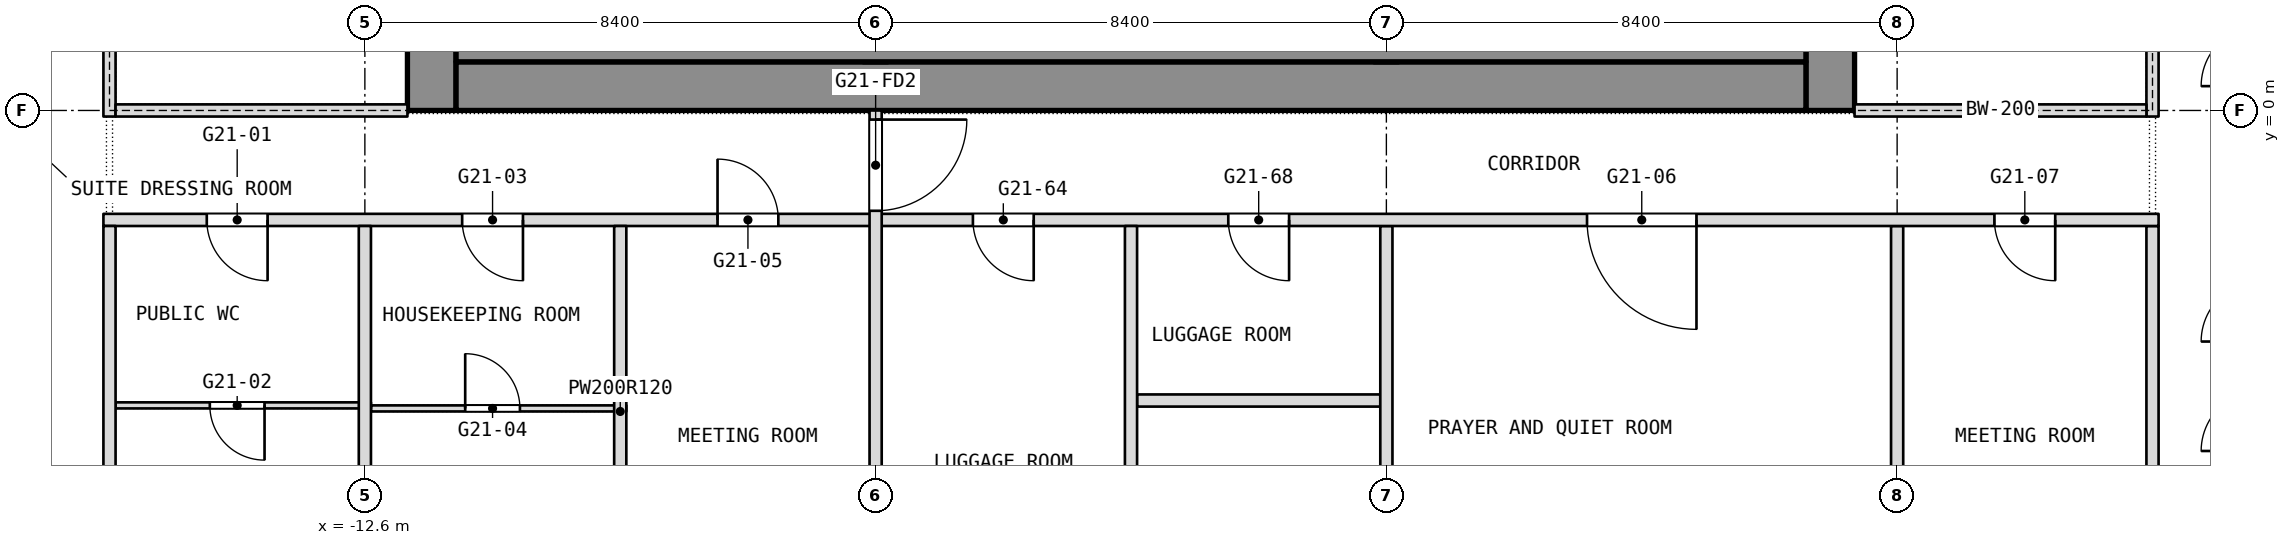
"""IFC4 building model, lengths in metres.
Left out: names, types, materials, properties, quantities, classifications, styles, units other than length and angle.
Written with IfcOpenShell. Run it as: python <this file> out.ifc"""

import sys

from ifc_helpers import new_model, si_unit, direction, frame, frame_2d, origin, place, context, subcontext, project, spatial, rectangle, extrude, element, fill, save


model = new_model("IFC4")
c1 = context("Model", 3, precision=1e-05, world=origin(), true_north=direction((0.0, 1.0)))
c2 = subcontext(c1, "Body", "Model", "MODEL_VIEW")
j1 = project(units=[si_unit("LENGTHUNIT", "METRE"), si_unit("PLANEANGLEUNIT", "RADIAN")], contexts=[c1])
p1 = place(None, origin())
s1 = spatial("IfcSite", under=j1, at=p1, CompositionType="ELEMENT")
p2 = place(p1, origin())
s2 = spatial("IfcBuilding", under=s1, at=p2, CompositionType="ELEMENT")
p3 = place(p2, frame((0.0, 0.0, 245.3)))
s3 = spatial("IfcBuildingStorey", under=s2, at=p3, CompositionType="ELEMENT", Elevation=245.3)
p4 = place(p3, frame((11.5, 0.0, 0.0), z_axis=(0.0, 0.0, 1.0), x_axis=(0.0, 1.0, 0.0)))
e1 = element("IfcWall", 1, at=p4, inside=s3, PredefinedType="SHEAR", context=c2, shape_type="SweptSolid", body=[
    extrude(rectangle(XDim=16.8, YDim=0.8, at=frame_2d((8.4, 0.0))), origin(), (0.0, 0.0, 1.0), 3.6),
])
p5 = place(p4, frame((2.3, 0.0, 0.0)))
e2 = element("IfcOpeningElement", 2, at=p5, cuts=e1, PredefinedType="OPENING", context=c2, shape_type="SweptSolid", body=[
    extrude(rectangle(XDim=1.1, YDim=2.1, at=frame_2d((0.55, 1.05))), frame((0.0, 0.4, 0.0), z_axis=(0.0, -1.0, 0.0), x_axis=(1.0, 0.0, 0.0)), (0.0, 0.0, 1.0), 0.8),
])
p6 = place(p4, frame((4.85, 0.0, 0.0)))
e3 = element("IfcOpeningElement", 3, at=p6, cuts=e1, PredefinedType="OPENING", context=c2, shape_type="SweptSolid", body=[
    extrude(rectangle(XDim=1.1, YDim=2.1, at=frame_2d((0.55, 1.05))), frame((0.0, 0.4, 0.0), z_axis=(0.0, -1.0, 0.0), x_axis=(1.0, 0.0, 0.0)), (0.0, 0.0, 1.0), 0.8),
])
p7 = place(p4, frame((6.825, 0.0, 0.0)))
e4 = element("IfcOpeningElement", 4, at=p7, cuts=e1, PredefinedType="OPENING", context=c2, shape_type="SweptSolid", body=[
    extrude(rectangle(XDim=1.2, YDim=2.1, at=frame_2d((0.6, 1.05))), frame((0.0, 0.4, 0.0), z_axis=(0.0, -1.0, 0.0), x_axis=(1.0, 0.0, 0.0)), (0.0, 0.0, 1.0), 0.8),
])
p8 = place(p4, frame((13.4, 0.0, 0.0)))
e5 = element("IfcOpeningElement", 5, at=p8, cuts=e1, PredefinedType="OPENING", context=c2, shape_type="SweptSolid", body=[
    extrude(rectangle(XDim=1.1, YDim=2.1, at=frame_2d((0.55, 1.05))), frame((0.0, 0.4, 0.0), z_axis=(0.0, -1.0, 0.0), x_axis=(1.0, 0.0, 0.0)), (0.0, 0.0, 1.0), 0.8),
])
p9 = place(p4, frame((10.85, 0.0, 0.0)))
e6 = element("IfcOpeningElement", 6, at=p9, cuts=e1, PredefinedType="OPENING", context=c2, shape_type="SweptSolid", body=[
    extrude(rectangle(XDim=1.1, YDim=2.1, at=frame_2d((0.55, 1.05))), frame((0.0, 0.4, 0.0), z_axis=(0.0, -1.0, 0.0), x_axis=(1.0, 0.0, 0.0)), (0.0, 0.0, 1.0), 0.8),
])
p10 = place(p4, frame((8.775, 0.0, 0.0)))
e7 = element("IfcOpeningElement", 7, at=p10, cuts=e1, PredefinedType="OPENING", context=c2, shape_type="SweptSolid", body=[
    extrude(rectangle(XDim=1.2, YDim=2.1, at=frame_2d((0.6, 1.05))), frame((0.0, 0.4, 0.0), z_axis=(0.0, -1.0, 0.0), x_axis=(1.0, 0.0, 0.0)), (0.0, 0.0, 1.0), 0.8),
])
p11 = place(p3, frame((-11.5, 0.0, 0.0), z_axis=(0.0, 0.0, 1.0), x_axis=(0.0, 1.0, 0.0)))
e8 = element("IfcWall", 8, at=p11, inside=s3, PredefinedType="SHEAR", context=c2, shape_type="SweptSolid", body=[
    extrude(rectangle(XDim=16.8, YDim=0.8, at=frame_2d((8.4, 0.0))), origin(), (0.0, 0.0, 1.0), 3.6),
])
p12 = place(p11, frame((3.6, 0.0, 0.0)))
e9 = element("IfcOpeningElement", 9, at=p12, cuts=e8, PredefinedType="OPENING", context=c2, shape_type="SweptSolid", body=[
    extrude(rectangle(XDim=0.9, YDim=2.1, at=frame_2d((0.45, 1.05))), frame((0.0, 0.4, 0.0), z_axis=(0.0, -1.0, 0.0), x_axis=(1.0, 0.0, 0.0)), (0.0, 0.0, 1.0), 0.8),
])
p13 = place(p11, frame((6.825, 0.0, 0.0)))
e10 = element("IfcOpeningElement", 10, at=p13, cuts=e8, PredefinedType="OPENING", context=c2, shape_type="SweptSolid", body=[
    extrude(rectangle(XDim=1.2, YDim=2.1, at=frame_2d((0.6, 1.05))), frame((0.0, 0.4, 0.0), z_axis=(0.0, -1.0, 0.0), x_axis=(1.0, 0.0, 0.0)), (0.0, 0.0, 1.0), 0.8),
])
p14 = place(p11, frame((14.062, 0.0, 0.0)))
e11 = element("IfcOpeningElement", 11, at=p14, cuts=e8, PredefinedType="OPENING", context=c2, shape_type="SweptSolid", body=[
    extrude(rectangle(XDim=0.9, YDim=2.1, at=frame_2d((0.45, 1.05))), frame((0.0, 0.4, 0.0), z_axis=(0.0, -1.0, 0.0), x_axis=(1.0, 0.0, 0.0)), (0.0, 0.0, 1.0), 0.8),
])
p15 = place(p11, frame((11.438, 0.0, 0.0)))
e12 = element("IfcOpeningElement", 12, at=p15, cuts=e8, PredefinedType="OPENING", context=c2, shape_type="SweptSolid", body=[
    extrude(rectangle(XDim=0.9, YDim=2.1, at=frame_2d((0.45, 1.05))), frame((0.0, 0.4, 0.0), z_axis=(0.0, -1.0, 0.0), x_axis=(1.0, 0.0, 0.0)), (0.0, 0.0, 1.0), 0.8),
])
p16 = place(p11, frame((8.775, 0.0, 0.0)))
e13 = element("IfcOpeningElement", 13, at=p16, cuts=e8, PredefinedType="OPENING", context=c2, shape_type="SweptSolid", body=[
    extrude(rectangle(XDim=1.2, YDim=2.1, at=frame_2d((0.6, 1.05))), frame((0.0, 0.4, 0.0), z_axis=(0.0, -1.0, 0.0), x_axis=(1.0, 0.0, 0.0)), (0.0, 0.0, 1.0), 0.8),
])
p17 = place(p3, frame((-11.1, 0.4, 0.0), z_axis=(0.0, 0.0, 1.0), x_axis=(1.0, 0.0, 0.0)))
e14 = element("IfcWall", 14, at=p17, inside=s3, PredefinedType="SHEAR", context=c2, shape_type="SweptSolid", body=[
    extrude(rectangle(XDim=22.2, YDim=0.8, at=frame_2d((11.1, 0.0))), origin(), (0.0, 0.0, 1.0), 3.6),
])
p18 = place(p3, frame((-4.2, 0.8, 0.0), z_axis=(0.0, 0.0, 1.0), x_axis=(0.0, 1.0, 0.0)))
e15 = element("IfcWall", 15, at=p18, inside=s3, PredefinedType="SHEAR", context=c2, shape_type="SweptSolid", body=[
    extrude(rectangle(XDim=15.2, YDim=0.4, at=frame_2d((7.6, 0.0))), origin(), (0.0, 0.0, 1.0), 3.6),
])
p19 = place(p18, frame((8.5, 0.0, 0.0)))
e16 = element("IfcOpeningElement", 16, at=p19, cuts=e15, PredefinedType="OPENING", context=c2, shape_type="SweptSolid", body=[
    extrude(rectangle(XDim=1.2, YDim=2.1, at=frame_2d((0.6, 1.05))), frame((0.0, 0.2, 0.0), z_axis=(0.0, -1.0, 0.0), x_axis=(1.0, 0.0, 0.0)), (0.0, 0.0, 1.0), 0.4),
])
p20 = place(p3, frame((4.2, 0.8, 0.0), z_axis=(0.0, 0.0, 1.0), x_axis=(0.0, 1.0, 0.0)))
e17 = element("IfcWall", 17, at=p20, inside=s3, PredefinedType="SHEAR", context=c2, shape_type="SweptSolid", body=[
    extrude(rectangle(XDim=15.2, YDim=0.4, at=frame_2d((7.6, 0.0))), origin(), (0.0, 0.0, 1.0), 3.6),
])
p21 = place(p20, frame((5.95, 0.0, 0.0)))
e18 = element("IfcOpeningElement", 18, at=p21, cuts=e17, PredefinedType="OPENING", context=c2, shape_type="SweptSolid", body=[
    extrude(rectangle(XDim=1.2, YDim=2.1, at=frame_2d((0.6, 1.05))), frame((0.0, 0.2, 0.0), z_axis=(0.0, -1.0, 0.0), x_axis=(1.0, 0.0, 0.0)), (0.0, 0.0, 1.0), 0.4),
])
for number, where, z_axis, x_axis in (
    (19, (16.8, -7.8, 0.0), (0.0, 0.0, 1.0), (0.0, 1.0, 0.0)),
    (20, (12.6, -7.8, 0.0), (0.0, 0.0, 1.0), (0.0, 1.0, 0.0)),
):
    element("IfcWall", number, at=place(p3, frame(where, z_axis=z_axis, x_axis=x_axis)), inside=s3, PredefinedType="PARTITIONING", context=c2, shape_type="SweptSolid", body=[
        extrude(rectangle(XDim=5.9, YDim=0.2, at=frame_2d((2.95, 0.0))), origin(), (0.0, 0.0, 1.0), 3.34),
    ])
p22 = place(p3, frame((-12.5, -4.9, 0.0), z_axis=(0.0, 0.0, 1.0), x_axis=(1.0, 0.0, 0.0)))
e21 = element("IfcWall", 21, at=p22, inside=s3, PredefinedType="PARTITIONING", context=c2, shape_type="SweptSolid", body=[
    extrude(rectangle(XDim=4.2, YDim=0.1, at=frame_2d((2.1, 0.0))), origin(), (0.0, 0.0, 1.0), 3.34),
])
p23 = place(p22, frame((1.55, 0.0, 0.0)))
e22 = element("IfcOpeningElement", 22, at=p23, cuts=e21, PredefinedType="OPENING", context=c2, shape_type="SweptSolid", body=[
    extrude(rectangle(XDim=0.9, YDim=2.1, at=frame_2d((0.45, 1.05))), frame((0.0, 0.05, 0.0), z_axis=(0.0, -1.0, 0.0), x_axis=(1.0, 0.0, 0.0)), (0.0, 0.0, 1.0), 0.1),
])
p24 = place(p3, frame((-16.7, -4.85, 0.0), z_axis=(0.0, 0.0, 1.0), x_axis=(1.0, 0.0, 0.0)))
e23 = element("IfcWall", 23, at=p24, inside=s3, PredefinedType="PARTITIONING", context=c2, shape_type="SweptSolid", body=[
    extrude(rectangle(XDim=4.2, YDim=0.1, at=frame_2d((2.1, 0.0))), origin(), (0.0, 0.0, 1.0), 3.34),
])
p25 = place(p24, frame((1.55, 0.0, 0.0)))
e24 = element("IfcOpeningElement", 24, at=p25, cuts=e23, PredefinedType="OPENING", context=c2, shape_type="SweptSolid", body=[
    extrude(rectangle(XDim=0.9, YDim=2.1, at=frame_2d((0.45, 1.05))), frame((0.0, 0.05, 0.0), z_axis=(0.0, -1.0, 0.0), x_axis=(1.0, 0.0, 0.0)), (0.0, 0.0, 1.0), 0.1),
])
p26 = place(p3, frame((0.1, -4.77, 0.0), z_axis=(0.0, 0.0, 1.0), x_axis=(1.0, 0.0, 0.0)))
e25 = element("IfcWall", 25, at=p26, inside=s3, PredefinedType="PARTITIONING", context=c2, shape_type="SweptSolid", body=[
    extrude(rectangle(XDim=4.0, YDim=0.2, at=frame_2d((2.0, 0.0))), origin(), (0.0, 0.0, 1.0), 3.34),
])
p27 = place(p3, frame((4.2, -11.6, 0.0), z_axis=(0.0, 0.0, 1.0), x_axis=(0.0, 1.0, 0.0)))
e26 = element("IfcWall", 26, at=p27, inside=s3, PredefinedType="PARTITIONING", context=c2, shape_type="SweptSolid", body=[
    extrude(rectangle(XDim=9.7, YDim=0.2, at=frame_2d((4.85, 0.0))), origin(), (0.0, 0.0, 1.0), 3.34),
])
p28 = place(p3, frame((-16.9, -1.8, 0.0), z_axis=(0.0, 0.0, 1.0), x_axis=(1.0, 0.0, 0.0)))
e27 = element("IfcWall", 27, at=p28, inside=s3, PredefinedType="PARTITIONING", context=c2, shape_type="SweptSolid", body=[
    extrude(rectangle(XDim=33.8, YDim=0.2, at=frame_2d((16.9, 0.0))), origin(), (0.0, 0.0, 1.0), 3.34),
])
p29 = place(p28, frame((1.7, 0.0, 0.0)))
e28 = element("IfcOpeningElement", 28, at=p29, cuts=e27, PredefinedType="OPENING", context=c2, shape_type="SweptSolid", body=[
    extrude(rectangle(XDim=1.0, YDim=2.1, at=frame_2d((0.5, 1.05))), frame((0.0, 0.1, 0.0), z_axis=(0.0, -1.0, 0.0), x_axis=(1.0, 0.0, 0.0)), (0.0, 0.0, 1.0), 0.2),
])
p30 = place(p28, frame((5.9, 0.0, 0.0)))
e29 = element("IfcOpeningElement", 29, at=p30, cuts=e27, PredefinedType="OPENING", context=c2, shape_type="SweptSolid", body=[
    extrude(rectangle(XDim=1.0, YDim=2.1, at=frame_2d((0.5, 1.05))), frame((0.0, 0.1, 0.0), z_axis=(0.0, -1.0, 0.0), x_axis=(1.0, 0.0, 0.0)), (0.0, 0.0, 1.0), 0.2),
])
p31 = place(p28, frame((10.1, 0.0, 0.0)))
e30 = element("IfcOpeningElement", 30, at=p31, cuts=e27, PredefinedType="OPENING", context=c2, shape_type="SweptSolid", body=[
    extrude(rectangle(XDim=1.0, YDim=2.1, at=frame_2d((0.5, 1.05))), frame((0.0, 0.1, 0.0), z_axis=(0.0, -1.0, 0.0), x_axis=(1.0, 0.0, 0.0)), (0.0, 0.0, 1.0), 0.2),
])
p32 = place(p28, frame((24.4, 0.0, 0.0)))
e31 = element("IfcOpeningElement", 31, at=p32, cuts=e27, PredefinedType="OPENING", context=c2, shape_type="SweptSolid", body=[
    extrude(rectangle(XDim=1.8, YDim=2.1, at=frame_2d((0.9, 1.05))), frame((0.0, 0.1, 0.0), z_axis=(0.0, -1.0, 0.0), x_axis=(1.0, 0.0, 0.0)), (0.0, 0.0, 1.0), 0.2),
])
p33 = place(p28, frame((31.1, 0.0, 0.0)))
e32 = element("IfcOpeningElement", 32, at=p33, cuts=e27, PredefinedType="OPENING", context=c2, shape_type="SweptSolid", body=[
    extrude(rectangle(XDim=1.0, YDim=2.1, at=frame_2d((0.5, 1.05))), frame((0.0, 0.1, 0.0), z_axis=(0.0, -1.0, 0.0), x_axis=(1.0, 0.0, 0.0)), (0.0, 0.0, 1.0), 0.2),
])
p34 = place(p28, frame((14.3, 0.0, 0.0)))
e33 = element("IfcOpeningElement", 33, at=p34, cuts=e27, PredefinedType="OPENING", context=c2, shape_type="SweptSolid", body=[
    extrude(rectangle(XDim=1.0, YDim=2.1, at=frame_2d((0.5, 1.05))), frame((0.0, 0.1, 0.0), z_axis=(0.0, -1.0, 0.0), x_axis=(1.0, 0.0, 0.0)), (0.0, 0.0, 1.0), 0.2),
])
p35 = place(p28, frame((18.5, 0.0, 0.0)))
e34 = element("IfcOpeningElement", 34, at=p35, cuts=e27, PredefinedType="OPENING", context=c2, shape_type="SweptSolid", body=[
    extrude(rectangle(XDim=1.0, YDim=2.1, at=frame_2d((0.5, 1.05))), frame((0.0, 0.1, 0.0), z_axis=(0.0, -1.0, 0.0), x_axis=(1.0, 0.0, 0.0)), (0.0, 0.0, 1.0), 0.2),
])
p36 = place(p3, frame((0.0, -11.6, 0.0), z_axis=(0.0, 0.0, 1.0), x_axis=(0.0, 1.0, 0.0)))
e35 = element("IfcWall", 35, at=p36, inside=s3, PredefinedType="PARTITIONING", context=c2, shape_type="SweptSolid", body=[
    extrude(rectangle(XDim=9.7, YDim=0.2, at=frame_2d((4.85, 0.0))), origin(), (0.0, 0.0, 1.0), 3.34),
])
p37 = place(p3, frame((-4.2, -13.6, 0.0), z_axis=(0.0, 0.0, 1.0), x_axis=(0.0, 1.0, 0.0)))
e36 = element("IfcWall", 36, at=p37, inside=s3, PredefinedType="PARTITIONING", context=c2, shape_type="SweptSolid", body=[
    extrude(rectangle(XDim=13.6, YDim=0.2, at=frame_2d((6.8, 0.0))), origin(), (0.0, 0.0, 1.0), 3.34),
])
p38 = place(p37, frame((11.95, 0.0, 0.0)))
e37 = element("IfcOpeningElement", 37, at=p38, cuts=e36, PredefinedType="OPENING", context=c2, shape_type="SweptSolid", body=[
    extrude(rectangle(XDim=1.5, YDim=2.1, at=frame_2d((0.75, 1.05))), frame((0.0, 0.1, 0.0), z_axis=(0.0, -1.0, 0.0), x_axis=(1.0, 0.0, 0.0)), (0.0, 0.0, 1.0), 0.2),
])
p39 = place(p37, frame((0.25, 0.0, 0.0)))
e38 = element("IfcOpeningElement", 38, at=p39, cuts=e36, PredefinedType="OPENING", context=c2, shape_type="SweptSolid", body=[
    extrude(rectangle(XDim=1.5, YDim=2.1, at=frame_2d((0.75, 1.05))), frame((0.0, 0.1, 0.0), z_axis=(0.0, -1.0, 0.0), x_axis=(1.0, 0.0, 0.0)), (0.0, 0.0, 1.0), 0.2),
])
p40 = place(p3, frame((-8.4, -8.0, 0.0), z_axis=(0.0, 0.0, 1.0), x_axis=(0.0, 1.0, 0.0)))
e39 = element("IfcWall", 39, at=p40, inside=s3, PredefinedType="PARTITIONING", context=c2, shape_type="SweptSolid", body=[
    extrude(rectangle(XDim=6.1, YDim=0.2, at=frame_2d((3.05, 0.0))), origin(), (0.0, 0.0, 1.0), 3.34),
])
p41 = place(p3, frame((-12.6, -7.8, 0.0), z_axis=(0.0, 0.0, 1.0), x_axis=(0.0, 1.0, 0.0)))
e40 = element("IfcWall", 40, at=p41, inside=s3, PredefinedType="PARTITIONING", context=c2, shape_type="SweptSolid", body=[
    extrude(rectangle(XDim=5.9, YDim=0.2, at=frame_2d((2.95, 0.0))), origin(), (0.0, 0.0, 1.0), 3.34),
])
p42 = place(p3, frame((-16.8, -8.0, 0.0), z_axis=(0.0, 0.0, 1.0), x_axis=(0.0, 1.0, 0.0)))
e41 = element("IfcWall", 41, at=p42, inside=s3, PredefinedType="PARTITIONING", context=c2, shape_type="SweptSolid", body=[
    extrude(rectangle(XDim=6.1, YDim=0.2, at=frame_2d((3.05, 0.0))), origin(), (0.0, 0.0, 1.0), 3.34),
])
p43 = place(p3, frame((-11.1, 1.15, 0.0), z_axis=(0.0, 0.0, 1.0), x_axis=(1.0, 0.0, 0.0)))
e42 = element("IfcWall", 42, at=p43, inside=s3, PredefinedType="PARTITIONING", context=c2, shape_type="SweptSolid", body=[
    extrude(rectangle(XDim=22.2, YDim=0.7, at=frame_2d((11.1, 0.0))), origin(), (0.0, 0.0, 1.0), 3.34),
])
p44 = place(p3, frame((-16.8, -0.1, 0.0), z_axis=(0.0, 0.0, 1.0), x_axis=(0.0, 1.0, 0.0)))
e43 = element("IfcWall", 43, at=p44, inside=s3, PredefinedType="PARTITIONING", context=c2, shape_type="SweptSolid", body=[
    extrude(rectangle(XDim=17.0, YDim=0.2, at=frame_2d((8.5, 0.0))), origin(), (0.0, 0.0, 1.0), 3.34),
])
p45 = place(p44, frame((2.2, 0.0, 0.0)))
e44 = element("IfcOpeningElement", 44, at=p45, cuts=e43, PredefinedType="OPENING", context=c2, shape_type="SweptSolid", body=[
    extrude(rectangle(XDim=1.8, YDim=2.1, at=frame_2d((0.9, 1.05))), frame((0.0, 0.1, 0.0), z_axis=(0.0, -1.0, 0.0), x_axis=(1.0, 0.0, 0.0)), (0.0, 0.0, 1.0), 0.2),
])
p46 = place(p44, frame((13.0, 0.0, 0.0)))
e45 = element("IfcOpeningElement", 45, at=p46, cuts=e43, PredefinedType="OPENING", context=c2, shape_type="SweptSolid", body=[
    extrude(rectangle(XDim=1.8, YDim=2.1, at=frame_2d((0.9, 1.05))), frame((0.0, 0.1, 0.0), z_axis=(0.0, -1.0, 0.0), x_axis=(1.0, 0.0, 0.0)), (0.0, 0.0, 1.0), 0.2),
])
p47 = place(p3, frame((-16.7, 0.0, 0.0), z_axis=(0.0, 0.0, 1.0), x_axis=(1.0, 0.0, 0.0)))
e46 = element("IfcWall", 46, at=p47, inside=s3, PredefinedType="PARTITIONING", context=c2, shape_type="SweptSolid", body=[
    extrude(rectangle(XDim=4.8, YDim=0.2, at=frame_2d((2.4, 0.0))), origin(), (0.0, 0.0, 1.0), 2.94),
])
p48 = place(p3, frame((16.8, -0.1, 0.0), z_axis=(0.0, 0.0, 1.0), x_axis=(0.0, 1.0, 0.0)))
e47 = element("IfcWall", 47, at=p48, inside=s3, PredefinedType="PARTITIONING", context=c2, shape_type="SweptSolid", body=[
    extrude(rectangle(XDim=17.0, YDim=0.2, at=frame_2d((8.5, 0.0))), origin(), (0.0, 0.0, 1.0), 3.34),
])
p49 = place(p48, frame((2.2, 0.0, 0.0)))
e48 = element("IfcOpeningElement", 48, at=p49, cuts=e47, PredefinedType="OPENING", context=c2, shape_type="SweptSolid", body=[
    extrude(rectangle(XDim=1.8, YDim=2.1, at=frame_2d((0.9, 1.05))), frame((0.0, 0.1, 0.0), z_axis=(0.0, -1.0, 0.0), x_axis=(1.0, 0.0, 0.0)), (0.0, 0.0, 1.0), 0.2),
])
p50 = place(p48, frame((13.0, 0.0, 0.0)))
e49 = element("IfcOpeningElement", 49, at=p50, cuts=e47, PredefinedType="OPENING", context=c2, shape_type="SweptSolid", body=[
    extrude(rectangle(XDim=1.8, YDim=2.1, at=frame_2d((0.9, 1.05))), frame((0.0, 0.1, 0.0), z_axis=(0.0, -1.0, 0.0), x_axis=(1.0, 0.0, 0.0)), (0.0, 0.0, 1.0), 0.2),
])
p51 = place(p3, frame((11.9, 0.0, 0.0), z_axis=(0.0, 0.0, 1.0), x_axis=(1.0, 0.0, 0.0)))
e50 = element("IfcWall", 50, at=p51, inside=s3, PredefinedType="PARTITIONING", context=c2, shape_type="SweptSolid", body=[
    extrude(rectangle(XDim=4.8, YDim=0.2, at=frame_2d((2.4, 0.0))), origin(), (0.0, 0.0, 1.0), 2.94),
])
p52 = place(p23, origin())
e51 = element("IfcDoor", 51, at=p52, inside=s3, OperationType="SINGLE_SWING_RIGHT", PredefinedType="DOOR", context=c2, shape_type="SweptSolid", body=[
    extrude(rectangle(XDim=0.9, YDim=2.1, at=frame_2d((0.45, 1.05))), frame((0.0, 0.025, 0.0), z_axis=(0.0, -1.0, 0.0), x_axis=(1.0, 0.0, 0.0)), (0.0, 0.0, 1.0), 0.05),
])
fill(e22, e51)
p53 = place(p25, origin())
e52 = element("IfcDoor", 52, at=p53, inside=s3, OperationType="SINGLE_SWING_RIGHT", PredefinedType="DOOR", context=c2, shape_type="SweptSolid", body=[
    extrude(rectangle(XDim=0.9, YDim=2.1, at=frame_2d((0.45, 1.05))), frame((0.0, 0.025, 0.0), z_axis=(0.0, -1.0, 0.0), x_axis=(1.0, 0.0, 0.0)), (0.0, 0.0, 1.0), 0.05),
])
fill(e24, e52)
p54 = place(p29, origin())
e53 = element("IfcDoor", 53, at=p54, inside=s3, OperationType="SINGLE_SWING_LEFT", PredefinedType="DOOR", context=c2, shape_type="SweptSolid", body=[
    extrude(rectangle(XDim=1.0, YDim=2.1, at=frame_2d((0.5, 1.05))), frame((0.0, 0.025, 0.0), z_axis=(0.0, -1.0, 0.0), x_axis=(1.0, 0.0, 0.0)), (0.0, 0.0, 1.0), 0.05),
])
fill(e28, e53)
p55 = place(p30, origin())
e54 = element("IfcDoor", 54, at=p55, inside=s3, OperationType="SINGLE_SWING_LEFT", PredefinedType="DOOR", context=c2, shape_type="SweptSolid", body=[
    extrude(rectangle(XDim=1.0, YDim=2.1, at=frame_2d((0.5, 1.05))), frame((0.0, 0.025, 0.0), z_axis=(0.0, -1.0, 0.0), x_axis=(1.0, 0.0, 0.0)), (0.0, 0.0, 1.0), 0.05),
])
fill(e29, e54)
p56 = place(p31, origin())
e55 = element("IfcDoor", 55, at=p56, inside=s3, OperationType="SINGLE_SWING_RIGHT", PredefinedType="DOOR", context=c2, shape_type="SweptSolid", body=[
    extrude(rectangle(XDim=1.0, YDim=2.1, at=frame_2d((0.5, 1.05))), frame((0.0, 0.025, 0.0), z_axis=(0.0, -1.0, 0.0), x_axis=(1.0, 0.0, 0.0)), (0.0, 0.0, 1.0), 0.05),
])
fill(e30, e55)
p57 = place(p32, origin())
e56 = element("IfcDoor", 56, at=p57, inside=s3, OperationType="DOUBLE_DOOR_SINGLE_SWING", PredefinedType="DOOR", context=c2, shape_type="SweptSolid", body=[
    extrude(rectangle(XDim=1.8, YDim=2.1, at=frame_2d((0.9, 1.05))), frame((0.0, 0.025, 0.0), z_axis=(0.0, -1.0, 0.0), x_axis=(1.0, 0.0, 0.0)), (0.0, 0.0, 1.0), 0.05),
])
fill(e31, e56)
p58 = place(p33, origin())
e57 = element("IfcDoor", 57, at=p58, inside=s3, OperationType="SINGLE_SWING_RIGHT", PredefinedType="DOOR", context=c2, shape_type="SweptSolid", body=[
    extrude(rectangle(XDim=1.0, YDim=2.1, at=frame_2d((0.5, 1.05))), frame((0.0, 0.025, 0.0), z_axis=(0.0, -1.0, 0.0), x_axis=(1.0, 0.0, 0.0)), (0.0, 0.0, 1.0), 0.05),
])
fill(e32, e57)
p59 = place(p34, origin())
e58 = element("IfcDoor", 58, at=p59, inside=s3, OperationType="SINGLE_SWING_LEFT", PredefinedType="DOOR", context=c2, shape_type="SweptSolid", body=[
    extrude(rectangle(XDim=1.0, YDim=2.1, at=frame_2d((0.5, 1.05))), frame((0.0, 0.025, 0.0), z_axis=(0.0, -1.0, 0.0), x_axis=(1.0, 0.0, 0.0)), (0.0, 0.0, 1.0), 0.05),
])
fill(e33, e58)
p60 = place(p35, origin())
e59 = element("IfcDoor", 59, at=p60, inside=s3, OperationType="SINGLE_SWING_LEFT", PredefinedType="DOOR", context=c2, shape_type="SweptSolid", body=[
    extrude(rectangle(XDim=1.0, YDim=2.1, at=frame_2d((0.5, 1.05))), frame((0.0, 0.025, 0.0), z_axis=(0.0, -1.0, 0.0), x_axis=(1.0, 0.0, 0.0)), (0.0, 0.0, 1.0), 0.05),
])
fill(e34, e59)
p61 = place(p38, origin())
e60 = element("IfcDoor", 60, at=p61, inside=s3, OperationType="DOUBLE_DOOR_DOUBLE_SWING", PredefinedType="DOOR", context=c2, shape_type="SweptSolid", body=[
    extrude(rectangle(XDim=1.5, YDim=2.1, at=frame_2d((0.75, 1.05))), frame((0.0, 0.025, 0.0), z_axis=(0.0, -1.0, 0.0), x_axis=(1.0, 0.0, 0.0)), (0.0, 0.0, 1.0), 0.05),
])
fill(e37, e60)
save(model, sys.argv[1])
